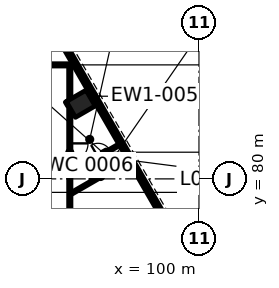
"""IFC4 building model, lengths in metres.
Left out: names, types, materials, properties, quantities, classifications, styles, units other than length and angle.
Written with IfcOpenShell. Run it as: python <this file> out.ifc"""

import sys

from ifc_helpers import new_model, si_unit, direction, frame, frame_2d, origin, origin_2d, place, context, subcontext, project, spatial, rectangle, extrude, element, fill, save


model = new_model("IFC4")
c1 = context("Model", 3, precision=1e-05, world=origin(), true_north=direction((0.0, 1.0)))
c2 = subcontext(c1, "Body", "Model", "MODEL_VIEW")
j1 = project(units=[si_unit("LENGTHUNIT", "METRE"), si_unit("PLANEANGLEUNIT", "RADIAN")], contexts=[c1])
p1 = place(None, origin())
s1 = spatial("IfcSite", under=j1, at=p1, CompositionType="ELEMENT")
p2 = place(p1, origin())
s2 = spatial("IfcBuilding", under=s1, at=p2, CompositionType="ELEMENT")
p3 = place(p2, origin())
s3 = spatial("IfcBuildingStorey", under=s2, at=p3, CompositionType="ELEMENT", Elevation=0.0)
p4 = place(p3, frame((92.22, 84.942, 0.0), z_axis=(0.0, 0.0, 1.0), x_axis=(-0.5, 0.866025403784, 0.0)))
e1 = element("IfcColumn", 1, at=p4, inside=s3, PredefinedType="COLUMN", context=c2, shape_type="SweptSolid", body=[
    extrude(rectangle(XDim=1.2, YDim=1.5, at=origin_2d()), origin(), (0.0, 0.0, 1.0), 8.0),
])
p5 = place(p3, frame((81.775, 87.5, 0.0), z_axis=(0.0, 0.0, 1.0), x_axis=(1.0, 0.0, 0.0)))
e2 = element("IfcWall", 2, at=p5, inside=s3, PredefinedType="PARTITIONING", context=c2, shape_type="SweptSolid", body=[
    extrude(rectangle(XDim=9.662, YDim=0.15, at=frame_2d((4.831, 0.0))), origin(), (0.0, 0.0, 1.0), 6.865),
])
p6 = place(p5, frame((4.381, 0.0, 0.0)))
e3 = element("IfcOpeningElement", 3, at=p6, cuts=e2, PredefinedType="OPENING", context=c2, shape_type="SweptSolid", body=[
    extrude(rectangle(XDim=0.9, YDim=2.1, at=frame_2d((0.45, 1.05))), frame((0.0, 0.085, 0.0), z_axis=(0.0, -1.0, 0.0), x_axis=(1.0, 0.0, 0.0)), (0.0, 0.0, 1.0), 0.17),
])
p7 = place(p3, frame((91.61, 79.047, 0.0), z_axis=(0.0, 0.0, 1.0), x_axis=(0.866032485742, 0.499987733489, 0.0)))
e4 = element("IfcWall", 4, at=p7, inside=s3, PredefinedType="PARTITIONING", context=c2, shape_type="SweptSolid", body=[
    extrude(rectangle(XDim=4.435, YDim=0.12, at=frame_2d((2.217, 0.0))), origin(), (0.0, 0.0, 1.0), 6.865),
])
p8 = place(p3, frame((92.95, 81.207, 0.0), z_axis=(0.0, 0.0, 1.0), x_axis=(0.866002138589, 0.500040294336, 0.0)))
e5 = element("IfcWall", 5, at=p8, inside=s3, PredefinedType="PARTITIONING", context=c2, shape_type="SweptSolid", body=[
    extrude(rectangle(XDim=2.194, YDim=0.12, at=frame_2d((1.097, 0.0))), origin(), (0.0, 0.0, 1.0), 6.865),
])
p9 = place(p8, frame((0.468, 0.0, 0.0)))
e6 = element("IfcOpeningElement", 6, at=p9, cuts=e5, PredefinedType="OPENING", context=c2, shape_type="SweptSolid", body=[
    extrude(rectangle(XDim=0.9, YDim=2.1, at=frame_2d((0.45, 1.05))), frame((0.0, 0.07, 0.0), z_axis=(0.0, -1.0, 0.0), x_axis=(1.0, 0.0, 0.0)), (0.0, 0.0, 1.0), 0.14),
])
p10 = place(p3, frame((92.95, 79.93, 0.0), z_axis=(0.0, 0.0, 1.0), x_axis=(0.0, 1.0, 0.0)))
e7 = element("IfcWall", 7, at=p10, inside=s3, PredefinedType="PARTITIONING", context=c2, shape_type="SweptSolid", body=[
    extrude(rectangle(XDim=1.207, YDim=0.12, at=frame_2d((0.604, 0.0))), origin(), (0.0, 0.0, 1.0), 7.1),
])
p11 = place(p3, frame((91.5, 84.69, 0.0), z_axis=(0.0, 0.0, 1.0), x_axis=(0.0, -1.0, 0.0)))
e8 = element("IfcWall", 8, at=p11, inside=s3, PredefinedType="PARTITIONING", context=c2, shape_type="SweptSolid", body=[
    extrude(rectangle(XDim=18.177, YDim=0.15, at=frame_2d((9.089, 0.0))), origin(), (0.0, 0.0, 1.0), 7.1),
])
p12 = place(p11, frame((2.355, 0.0, 0.0)))
e9 = element("IfcOpeningElement", 9, at=p12, cuts=e8, PredefinedType="OPENING", context=c2, shape_type="SweptSolid", body=[
    extrude(rectangle(XDim=1.2, YDim=2.1, at=frame_2d((0.6, 1.05))), frame((0.0, 0.085, 0.0), z_axis=(0.0, -1.0, 0.0), x_axis=(1.0, 0.0, 0.0)), (0.0, 0.0, 1.0), 0.17),
])
p13 = place(p11, frame((11.39, 0.0, 0.0)))
e10 = element("IfcOpeningElement", 10, at=p13, cuts=e8, PredefinedType="OPENING", context=c2, shape_type="SweptSolid", body=[
    extrude(rectangle(XDim=0.9, YDim=2.1, at=frame_2d((0.45, 1.05))), frame((0.0, 0.085, 0.0), z_axis=(0.0, -1.0, 0.0), x_axis=(1.0, 0.0, 0.0)), (0.0, 0.0, 1.0), 0.17),
])
p14 = place(p3, frame((91.5, 85.219, 0.0), z_axis=(0.0, 0.0, 1.0), x_axis=(0.0, 1.0, 0.0)))
e11 = element("IfcWall", 11, at=p14, inside=s3, PredefinedType="PARTITIONING", context=c2, shape_type="SweptSolid", body=[
    extrude(rectangle(XDim=2.17, YDim=0.15, at=frame_2d((1.085, 0.0))), origin(), (0.0, 0.0, 1.0), 6.865),
])
p15 = place(p3, frame((91.425, 84.821, 0.0), z_axis=(0.0, 0.0, 1.0), x_axis=(-0.4998141712, 0.866132665513, 0.0)))
e12 = element("IfcWall", 12, at=p15, inside=s3, PredefinedType="PARTITIONING", context=c2, shape_type="SweptSolid", body=[
    extrude(rectangle(XDim=0.307, YDim=0.15, at=frame_2d((0.154, 0.0))), origin(), (0.0, 0.0, 1.0), 7.1),
])
p16 = place(p3, frame((107.504, 60.451, 0.0), z_axis=(0.0, 0.0, 1.0), x_axis=(-0.500000550228, 0.86602508611, 0.0)))
e13 = element("IfcWall", 13, at=p16, inside=s3, PredefinedType="SOLIDWALL", context=c2, shape_type="SweptSolid", body=[
    extrude(rectangle(XDim=57.704, YDim=0.3, at=frame_2d((28.852, 0.0))), origin(), (0.0, 0.0, 1.0), 7.7),
])
p17 = place(p16, frame((56.104, 0.0, 0.0)))
e14 = element("IfcOpeningElement", 14, at=p17, cuts=e13, PredefinedType="OPENING", context=c2, shape_type="SweptSolid", body=[
    extrude(rectangle(XDim=1.2, YDim=2.4, at=frame_2d((0.6, 1.2))), frame((0.0, 0.16, 0.0), z_axis=(0.0, -1.0, 0.0), x_axis=(1.0, 0.0, 0.0)), (0.0, 0.0, 1.0), 0.32),
])
p18 = place(p16, frame((1.552, 0.0, 0.15)))
e15 = element("IfcOpeningElement", 15, at=p18, cuts=e13, PredefinedType="OPENING", context=c2, shape_type="SweptSolid", body=[
    extrude(rectangle(XDim=2.1, YDim=5.4, at=frame_2d((1.05, 2.7))), frame((0.0, 0.16, 0.0), z_axis=(0.0, -1.0, 0.0), x_axis=(1.0, 0.0, 0.0)), (0.0, 0.0, 1.0), 0.32),
])
p19 = place(p16, frame((4.052, 0.0, 0.15)))
e16 = element("IfcOpeningElement", 16, at=p19, cuts=e13, PredefinedType="OPENING", context=c2, shape_type="SweptSolid", body=[
    extrude(rectangle(XDim=2.1, YDim=5.4, at=frame_2d((1.05, 2.7))), frame((0.0, 0.16, 0.0), z_axis=(0.0, -1.0, 0.0), x_axis=(1.0, 0.0, 0.0)), (0.0, 0.0, 1.0), 0.32),
])
p20 = place(p16, frame((6.552, 0.0, 0.15)))
e17 = element("IfcOpeningElement", 17, at=p20, cuts=e13, PredefinedType="OPENING", context=c2, shape_type="SweptSolid", body=[
    extrude(rectangle(XDim=2.1, YDim=5.4, at=frame_2d((1.05, 2.7))), frame((0.0, 0.16, 0.0), z_axis=(0.0, -1.0, 0.0), x_axis=(1.0, 0.0, 0.0)), (0.0, 0.0, 1.0), 0.32),
])
p21 = place(p16, frame((9.052, 0.0, 0.15)))
e18 = element("IfcOpeningElement", 18, at=p21, cuts=e13, PredefinedType="OPENING", context=c2, shape_type="SweptSolid", body=[
    extrude(rectangle(XDim=2.1, YDim=5.4, at=frame_2d((1.05, 2.7))), frame((0.0, 0.16, 0.0), z_axis=(0.0, -1.0, 0.0), x_axis=(1.0, 0.0, 0.0)), (0.0, 0.0, 1.0), 0.32),
])
p22 = place(p16, frame((11.552, 0.0, 0.15)))
e19 = element("IfcOpeningElement", 19, at=p22, cuts=e13, PredefinedType="OPENING", context=c2, shape_type="SweptSolid", body=[
    extrude(rectangle(XDim=2.1, YDim=5.4, at=frame_2d((1.05, 2.7))), frame((0.0, 0.16, 0.0), z_axis=(0.0, -1.0, 0.0), x_axis=(1.0, 0.0, 0.0)), (0.0, 0.0, 1.0), 0.32),
])
p23 = place(p16, frame((14.052, 0.0, 0.15)))
e20 = element("IfcOpeningElement", 20, at=p23, cuts=e13, PredefinedType="OPENING", context=c2, shape_type="SweptSolid", body=[
    extrude(rectangle(XDim=2.1, YDim=5.4, at=frame_2d((1.05, 2.7))), frame((0.0, 0.16, 0.0), z_axis=(0.0, -1.0, 0.0), x_axis=(1.0, 0.0, 0.0)), (0.0, 0.0, 1.0), 0.32),
])
p24 = place(p16, frame((16.552, 0.0, 0.15)))
e21 = element("IfcOpeningElement", 21, at=p24, cuts=e13, PredefinedType="OPENING", context=c2, shape_type="SweptSolid", body=[
    extrude(rectangle(XDim=2.1, YDim=5.4, at=frame_2d((1.05, 2.7))), frame((0.0, 0.16, 0.0), z_axis=(0.0, -1.0, 0.0), x_axis=(1.0, 0.0, 0.0)), (0.0, 0.0, 1.0), 0.32),
])
p25 = place(p16, frame((19.052, 0.0, 0.15)))
e22 = element("IfcOpeningElement", 22, at=p25, cuts=e13, PredefinedType="OPENING", context=c2, shape_type="SweptSolid", body=[
    extrude(rectangle(XDim=2.1, YDim=5.4, at=frame_2d((1.05, 2.7))), frame((0.0, 0.16, 0.0), z_axis=(0.0, -1.0, 0.0), x_axis=(1.0, 0.0, 0.0)), (0.0, 0.0, 1.0), 0.32),
])
p26 = place(p16, frame((21.552, 0.0, 0.15)))
e23 = element("IfcOpeningElement", 23, at=p26, cuts=e13, PredefinedType="OPENING", context=c2, shape_type="SweptSolid", body=[
    extrude(rectangle(XDim=2.1, YDim=5.4, at=frame_2d((1.05, 2.7))), frame((0.0, 0.16, 0.0), z_axis=(0.0, -1.0, 0.0), x_axis=(1.0, 0.0, 0.0)), (0.0, 0.0, 1.0), 0.32),
])
p27 = place(p16, frame((24.052, 0.0, 0.15)))
e24 = element("IfcOpeningElement", 24, at=p27, cuts=e13, PredefinedType="OPENING", context=c2, shape_type="SweptSolid", body=[
    extrude(rectangle(XDim=2.1, YDim=5.4, at=frame_2d((1.05, 2.7))), frame((0.0, 0.16, 0.0), z_axis=(0.0, -1.0, 0.0), x_axis=(1.0, 0.0, 0.0)), (0.0, 0.0, 1.0), 0.32),
])
p28 = place(p16, frame((26.552, 0.0, 0.15)))
e25 = element("IfcOpeningElement", 25, at=p28, cuts=e13, PredefinedType="OPENING", context=c2, shape_type="SweptSolid", body=[
    extrude(rectangle(XDim=2.1, YDim=5.4, at=frame_2d((1.05, 2.7))), frame((0.0, 0.16, 0.0), z_axis=(0.0, -1.0, 0.0), x_axis=(1.0, 0.0, 0.0)), (0.0, 0.0, 1.0), 0.32),
])
p29 = place(p16, frame((29.052, 0.0, 0.15)))
e26 = element("IfcOpeningElement", 26, at=p29, cuts=e13, PredefinedType="OPENING", context=c2, shape_type="SweptSolid", body=[
    extrude(rectangle(XDim=2.1, YDim=5.4, at=frame_2d((1.05, 2.7))), frame((0.0, 0.16, 0.0), z_axis=(0.0, -1.0, 0.0), x_axis=(1.0, 0.0, 0.0)), (0.0, 0.0, 1.0), 0.32),
])
p30 = place(p16, frame((31.552, 0.0, 0.15)))
e27 = element("IfcOpeningElement", 27, at=p30, cuts=e13, PredefinedType="OPENING", context=c2, shape_type="SweptSolid", body=[
    extrude(rectangle(XDim=2.1, YDim=5.4, at=frame_2d((1.05, 2.7))), frame((0.0, 0.16, 0.0), z_axis=(0.0, -1.0, 0.0), x_axis=(1.0, 0.0, 0.0)), (0.0, 0.0, 1.0), 0.32),
])
p31 = place(p16, frame((34.052, 0.0, 0.15)))
e28 = element("IfcOpeningElement", 28, at=p31, cuts=e13, PredefinedType="OPENING", context=c2, shape_type="SweptSolid", body=[
    extrude(rectangle(XDim=2.1, YDim=5.4, at=frame_2d((1.05, 2.7))), frame((0.0, 0.16, 0.0), z_axis=(0.0, -1.0, 0.0), x_axis=(1.0, 0.0, 0.0)), (0.0, 0.0, 1.0), 0.32),
])
p32 = place(p16, frame((36.552, 0.0, 0.15)))
e29 = element("IfcOpeningElement", 29, at=p32, cuts=e13, PredefinedType="OPENING", context=c2, shape_type="SweptSolid", body=[
    extrude(rectangle(XDim=2.1, YDim=5.4, at=frame_2d((1.05, 2.7))), frame((0.0, 0.16, 0.0), z_axis=(0.0, -1.0, 0.0), x_axis=(1.0, 0.0, 0.0)), (0.0, 0.0, 1.0), 0.32),
])
p33 = place(p16, frame((39.052, 0.0, 0.15)))
e30 = element("IfcOpeningElement", 30, at=p33, cuts=e13, PredefinedType="OPENING", context=c2, shape_type="SweptSolid", body=[
    extrude(rectangle(XDim=2.1, YDim=5.4, at=frame_2d((1.05, 2.7))), frame((0.0, 0.16, 0.0), z_axis=(0.0, -1.0, 0.0), x_axis=(1.0, 0.0, 0.0)), (0.0, 0.0, 1.0), 0.32),
])
p34 = place(p16, frame((41.552, 0.0, 0.15)))
e31 = element("IfcOpeningElement", 31, at=p34, cuts=e13, PredefinedType="OPENING", context=c2, shape_type="SweptSolid", body=[
    extrude(rectangle(XDim=2.1, YDim=5.4, at=frame_2d((1.05, 2.7))), frame((0.0, 0.16, 0.0), z_axis=(0.0, -1.0, 0.0), x_axis=(1.0, 0.0, 0.0)), (0.0, 0.0, 1.0), 0.32),
])
p35 = place(p16, frame((44.052, 0.0, 0.15)))
e32 = element("IfcOpeningElement", 32, at=p35, cuts=e13, PredefinedType="OPENING", context=c2, shape_type="SweptSolid", body=[
    extrude(rectangle(XDim=2.1, YDim=5.4, at=frame_2d((1.05, 2.7))), frame((0.0, 0.16, 0.0), z_axis=(0.0, -1.0, 0.0), x_axis=(1.0, 0.0, 0.0)), (0.0, 0.0, 1.0), 0.32),
])
p36 = place(p16, frame((46.552, 0.0, 0.15)))
e33 = element("IfcOpeningElement", 33, at=p36, cuts=e13, PredefinedType="OPENING", context=c2, shape_type="SweptSolid", body=[
    extrude(rectangle(XDim=2.1, YDim=5.4, at=frame_2d((1.05, 2.7))), frame((0.0, 0.16, 0.0), z_axis=(0.0, -1.0, 0.0), x_axis=(1.0, 0.0, 0.0)), (0.0, 0.0, 1.0), 0.32),
])
p37 = place(p16, frame((49.052, 0.0, 0.15)))
e34 = element("IfcOpeningElement", 34, at=p37, cuts=e13, PredefinedType="OPENING", context=c2, shape_type="SweptSolid", body=[
    extrude(rectangle(XDim=2.1, YDim=5.4, at=frame_2d((1.05, 2.7))), frame((0.0, 0.16, 0.0), z_axis=(0.0, -1.0, 0.0), x_axis=(1.0, 0.0, 0.0)), (0.0, 0.0, 1.0), 0.32),
])
p38 = place(p16, frame((51.552, 0.0, 0.15)))
e35 = element("IfcOpeningElement", 35, at=p38, cuts=e13, PredefinedType="OPENING", context=c2, shape_type="SweptSolid", body=[
    extrude(rectangle(XDim=2.1, YDim=5.4, at=frame_2d((1.05, 2.7))), frame((0.0, 0.16, 0.0), z_axis=(0.0, -1.0, 0.0), x_axis=(1.0, 0.0, 0.0)), (0.0, 0.0, 1.0), 0.32),
])
p39 = place(p3, frame((107.106, 62.36, 0.0), z_axis=(0.0, 0.0, 1.0), x_axis=(-0.49999992739, 0.866025445706, 0.0)))
e36 = element("IfcWall", 36, at=p39, inside=s3, PredefinedType="SOLIDWALL", context=c2, shape_type="SweptSolid", body=[
    extrude(rectangle(XDim=54.0, YDim=0.4, at=frame_2d((27.0, 0.0))), origin(), (0.0, 0.0, 1.0), 7.64),
])
p40 = place(p3, frame((99.205, 82.595, 0.0), z_axis=(0.0, 0.0, 1.0), x_axis=(-0.500011643316, 0.866018681408, 0.0)))
e37 = element("IfcWall", 37, at=p40, inside=s3, PredefinedType="SOLIDWALL", context=c2, shape_type="SweptSolid", body=[
    extrude(rectangle(XDim=8.55, YDim=0.25, at=frame_2d((4.275, 0.0))), origin(), (0.0, 0.0, 1.0), 7.64),
])
p41 = place(p40, frame((0.875, 0.0, 0.0)))
e38 = element("IfcOpeningElement", 38, at=p41, cuts=e37, PredefinedType="OPENING", context=c2, shape_type="SweptSolid", body=[
    extrude(rectangle(XDim=1.1, YDim=2.1, at=frame_2d((0.55, 1.05))), frame((0.0, 0.135, 0.0), z_axis=(0.0, -1.0, 0.0), x_axis=(1.0, 0.0, 0.0)), (0.0, 0.0, 1.0), 0.27),
])
p42 = place(p40, frame((3.725, 0.0, 0.0)))
e39 = element("IfcOpeningElement", 39, at=p42, cuts=e37, PredefinedType="OPENING", context=c2, shape_type="SweptSolid", body=[
    extrude(rectangle(XDim=1.1, YDim=2.1, at=frame_2d((0.55, 1.05))), frame((0.0, 0.135, 0.0), z_axis=(0.0, -1.0, 0.0), x_axis=(1.0, 0.0, 0.0)), (0.0, 0.0, 1.0), 0.27),
])
p43 = place(p40, frame((6.575, 0.0, 0.0)))
e40 = element("IfcOpeningElement", 40, at=p43, cuts=e37, PredefinedType="OPENING", context=c2, shape_type="SweptSolid", body=[
    extrude(rectangle(XDim=1.1, YDim=2.1, at=frame_2d((0.55, 1.05))), frame((0.0, 0.135, 0.0), z_axis=(0.0, -1.0, 0.0), x_axis=(1.0, 0.0, 0.0)), (0.0, 0.0, 1.0), 0.27),
])
p44 = place(p3, frame((105.25, 72.125, 0.0), z_axis=(0.0, 0.0, 1.0), x_axis=(-0.499996309931, 0.866027534236, 0.0)))
e41 = element("IfcWall", 41, at=p44, inside=s3, PredefinedType="PARTITIONING", context=c2, shape_type="SweptSolid", body=[
    extrude(rectangle(XDim=12.09, YDim=0.2, at=frame_2d((6.045, 0.0))), origin(), (0.0, 0.0, 1.0), 7.64),
])
p45 = place(p44, frame((2.365, 0.0, 0.0)))
e42 = element("IfcOpeningElement", 42, at=p45, cuts=e41, PredefinedType="OPENING", context=c2, shape_type="SweptSolid", body=[
    extrude(rectangle(XDim=0.9, YDim=2.1, at=frame_2d((0.45, 1.05))), frame((0.0, 0.11, 0.0), z_axis=(0.0, -1.0, 0.0), x_axis=(1.0, 0.0, 0.0)), (0.0, 0.0, 1.0), 0.22),
])
p46 = place(p44, frame((8.365, 0.0, 0.0)))
e43 = element("IfcOpeningElement", 43, at=p46, cuts=e41, PredefinedType="OPENING", context=c2, shape_type="SweptSolid", body=[
    extrude(rectangle(XDim=0.9, YDim=2.1, at=frame_2d((0.45, 1.05))), frame((0.0, 0.11, 0.0), z_axis=(0.0, -1.0, 0.0), x_axis=(1.0, 0.0, 0.0)), (0.0, 0.0, 1.0), 0.22),
])
for number, where, z_axis, x_axis in (
    (44, (96.542, 81.058, 0.0), (0.0, 0.0, 1.0), (0.866, 0.5, 0.0)),
    (45, (95.117, 83.526, 0.0), (0.0, 0.0, 1.0), (0.866, 0.5, 0.0)),
    (46, (93.692, 85.994, 0.0), (0.0, 0.0, 1.0), (0.866, 0.5, 0.0)),
):
    element("IfcWall", number, at=place(p3, frame(where, z_axis=z_axis, x_axis=x_axis)), inside=s3, PredefinedType="SOLIDWALL", context=c2, shape_type="SweptSolid", body=[
        extrude(rectangle(XDim=2.95, YDim=0.25, at=frame_2d((1.475, 0.0))), origin(), (0.0, 0.0, 1.0), 7.64),
    ])
p47 = place(p3, frame((92.267, 88.462, 0.0), z_axis=(0.0, 0.0, 1.0), x_axis=(0.866024349092, 0.500001826776, 0.0)))
e47 = element("IfcWall", 47, at=p47, inside=s3, PredefinedType="SOLIDWALL", context=c2, shape_type="SweptSolid", body=[
    extrude(rectangle(XDim=2.95, YDim=0.25, at=frame_2d((1.475, 0.0))), origin(), (0.0, 0.0, 1.0), 7.64),
])
p48 = place(p3, frame((112.456, 65.794, 0.0), z_axis=(0.0, 0.0, 1.0), x_axis=(-0.499998559706, 0.866026235337, 0.0)))
e48 = element("IfcWall", 48, at=p48, inside=s3, PredefinedType="PARTITIONING", context=c2, shape_type="SweptSolid", body=[
    extrude(rectangle(XDim=53.4, YDim=0.2, at=frame_2d((26.7, 0.0))), origin(), (0.0, 0.0, 1.0), 7.64),
])
p49 = place(p48, frame((12.6, 0.0, 0.0)))
e49 = element("IfcOpeningElement", 49, at=p49, cuts=e48, PredefinedType="OPENING", context=c2, shape_type="SweptSolid", body=[
    extrude(rectangle(XDim=1.8, YDim=2.1, at=frame_2d((0.9, 1.05))), frame((0.0, 0.11, 0.0), z_axis=(0.0, -1.0, 0.0), x_axis=(1.0, 0.0, 0.0)), (0.0, 0.0, 1.0), 0.22),
])
p50 = place(p48, frame((25.8, 0.0, 0.0)))
e50 = element("IfcOpeningElement", 50, at=p50, cuts=e48, PredefinedType="OPENING", context=c2, shape_type="SweptSolid", body=[
    extrude(rectangle(XDim=1.8, YDim=2.1, at=frame_2d((0.9, 1.05))), frame((0.0, 0.11, 0.0), z_axis=(0.0, -1.0, 0.0), x_axis=(1.0, 0.0, 0.0)), (0.0, 0.0, 1.0), 0.22),
])
p51 = place(p48, frame((35.0, 0.0, 0.0)))
e51 = element("IfcOpeningElement", 51, at=p51, cuts=e48, PredefinedType="OPENING", context=c2, shape_type="SweptSolid", body=[
    extrude(rectangle(XDim=1.0, YDim=2.1, at=frame_2d((0.5, 1.05))), frame((0.0, 0.11, 0.0), z_axis=(0.0, -1.0, 0.0), x_axis=(1.0, 0.0, 0.0)), (0.0, 0.0, 1.0), 0.22),
])
p52 = place(p48, frame((45.75, 0.0, 0.0)))
e52 = element("IfcOpeningElement", 52, at=p52, cuts=e48, PredefinedType="OPENING", context=c2, shape_type="SweptSolid", body=[
    extrude(rectangle(XDim=1.8, YDim=2.1, at=frame_2d((0.9, 1.05))), frame((0.0, 0.11, 0.0), z_axis=(0.0, -1.0, 0.0), x_axis=(1.0, 0.0, 0.0)), (0.0, 0.0, 1.0), 0.22),
])
p53 = place(p9, origin())
e53 = element("IfcDoor", 53, at=p53, inside=s3, OperationType="SINGLE_SWING_LEFT", PredefinedType="DOOR", context=c2, shape_type="SweptSolid", body=[
    extrude(rectangle(XDim=0.9, YDim=2.1, at=frame_2d((0.45, 1.05))), frame((0.0, 0.025, 0.0), z_axis=(0.0, -1.0, 0.0), x_axis=(1.0, 0.0, 0.0)), (0.0, 0.0, 1.0), 0.05),
])
fill(e6, e53)
p54 = place(p12, origin())
e54 = element("IfcDoor", 54, at=p54, inside=s3, OperationType="DOUBLE_DOOR_SINGLE_SWING", PredefinedType="DOOR", context=c2, shape_type="SweptSolid", body=[
    extrude(rectangle(XDim=1.2, YDim=2.1, at=frame_2d((0.6, 1.05))), frame((0.0, 0.025, 0.0), z_axis=(0.0, -1.0, 0.0), x_axis=(1.0, 0.0, 0.0)), (0.0, 0.0, 1.0), 0.05),
])
fill(e9, e54)
p55 = place(p25, origin())
e55 = element("IfcWindow", 55, at=p55, inside=s3, PartitioningType="SINGLE_PANEL", PredefinedType="WINDOW", context=c2, shape_type="SweptSolid", body=[
    extrude(rectangle(XDim=2.1, YDim=5.4, at=frame_2d((1.05, 2.7))), frame((0.0, 0.03, 0.0), z_axis=(0.0, -1.0, 0.0), x_axis=(1.0, 0.0, 0.0)), (0.0, 0.0, 1.0), 0.06),
])
fill(e22, e55)
p56 = place(p26, origin())
e56 = element("IfcWindow", 56, at=p56, inside=s3, PartitioningType="SINGLE_PANEL", PredefinedType="WINDOW", context=c2, shape_type="SweptSolid", body=[
    extrude(rectangle(XDim=2.1, YDim=5.4, at=frame_2d((1.05, 2.7))), frame((0.0, 0.03, 0.0), z_axis=(0.0, -1.0, 0.0), x_axis=(1.0, 0.0, 0.0)), (0.0, 0.0, 1.0), 0.06),
])
fill(e23, e56)
p57 = place(p27, origin())
e57 = element("IfcWindow", 57, at=p57, inside=s3, PartitioningType="SINGLE_PANEL", PredefinedType="WINDOW", context=c2, shape_type="SweptSolid", body=[
    extrude(rectangle(XDim=2.1, YDim=5.4, at=frame_2d((1.05, 2.7))), frame((0.0, 0.03, 0.0), z_axis=(0.0, -1.0, 0.0), x_axis=(1.0, 0.0, 0.0)), (0.0, 0.0, 1.0), 0.06),
])
fill(e24, e57)
p58 = place(p28, origin())
e58 = element("IfcWindow", 58, at=p58, inside=s3, PartitioningType="SINGLE_PANEL", PredefinedType="WINDOW", context=c2, shape_type="SweptSolid", body=[
    extrude(rectangle(XDim=2.1, YDim=5.4, at=frame_2d((1.05, 2.7))), frame((0.0, 0.03, 0.0), z_axis=(0.0, -1.0, 0.0), x_axis=(1.0, 0.0, 0.0)), (0.0, 0.0, 1.0), 0.06),
])
fill(e25, e58)
p59 = place(p29, origin())
e59 = element("IfcWindow", 59, at=p59, inside=s3, PartitioningType="SINGLE_PANEL", PredefinedType="WINDOW", context=c2, shape_type="SweptSolid", body=[
    extrude(rectangle(XDim=2.1, YDim=5.4, at=frame_2d((1.05, 2.7))), frame((0.0, 0.03, 0.0), z_axis=(0.0, -1.0, 0.0), x_axis=(1.0, 0.0, 0.0)), (0.0, 0.0, 1.0), 0.06),
])
fill(e26, e59)
p60 = place(p30, origin())
e60 = element("IfcWindow", 60, at=p60, inside=s3, PartitioningType="SINGLE_PANEL", PredefinedType="WINDOW", context=c2, shape_type="SweptSolid", body=[
    extrude(rectangle(XDim=2.1, YDim=5.4, at=frame_2d((1.05, 2.7))), frame((0.0, 0.03, 0.0), z_axis=(0.0, -1.0, 0.0), x_axis=(1.0, 0.0, 0.0)), (0.0, 0.0, 1.0), 0.06),
])
fill(e27, e60)
p61 = place(p41, origin())
e61 = element("IfcDoor", 61, at=p61, inside=s3, OperationType="DOUBLE_DOOR_SLIDING", PredefinedType="DOOR", context=c2, shape_type="SweptSolid", body=[
    extrude(rectangle(XDim=1.1, YDim=2.1, at=frame_2d((0.55, 1.05))), frame((0.0, 0.025, 0.0), z_axis=(0.0, -1.0, 0.0), x_axis=(1.0, 0.0, 0.0)), (0.0, 0.0, 1.0), 0.05),
])
fill(e38, e61)
p62 = place(p42, origin())
e62 = element("IfcDoor", 62, at=p62, inside=s3, OperationType="DOUBLE_DOOR_SLIDING", PredefinedType="DOOR", context=c2, shape_type="SweptSolid", body=[
    extrude(rectangle(XDim=1.1, YDim=2.1, at=frame_2d((0.55, 1.05))), frame((0.0, 0.025, 0.0), z_axis=(0.0, -1.0, 0.0), x_axis=(1.0, 0.0, 0.0)), (0.0, 0.0, 1.0), 0.05),
])
fill(e39, e62)
p63 = place(p43, origin())
e63 = element("IfcDoor", 63, at=p63, inside=s3, OperationType="DOUBLE_DOOR_SLIDING", PredefinedType="DOOR", context=c2, shape_type="SweptSolid", body=[
    extrude(rectangle(XDim=1.1, YDim=2.1, at=frame_2d((0.55, 1.05))), frame((0.0, 0.025, 0.0), z_axis=(0.0, -1.0, 0.0), x_axis=(1.0, 0.0, 0.0)), (0.0, 0.0, 1.0), 0.05),
])
fill(e40, e63)
p64 = place(p50, origin())
e64 = element("IfcDoor", 64, at=p64, inside=s3, OperationType="DOUBLE_DOOR_SINGLE_SWING", PredefinedType="DOOR", context=c2, shape_type="SweptSolid", body=[
    extrude(rectangle(XDim=1.8, YDim=2.1, at=frame_2d((0.9, 1.05))), frame((0.0, 0.025, 0.0), z_axis=(0.0, -1.0, 0.0), x_axis=(1.0, 0.0, 0.0)), (0.0, 0.0, 1.0), 0.05),
])
fill(e50, e64)
save(model, sys.argv[1])
